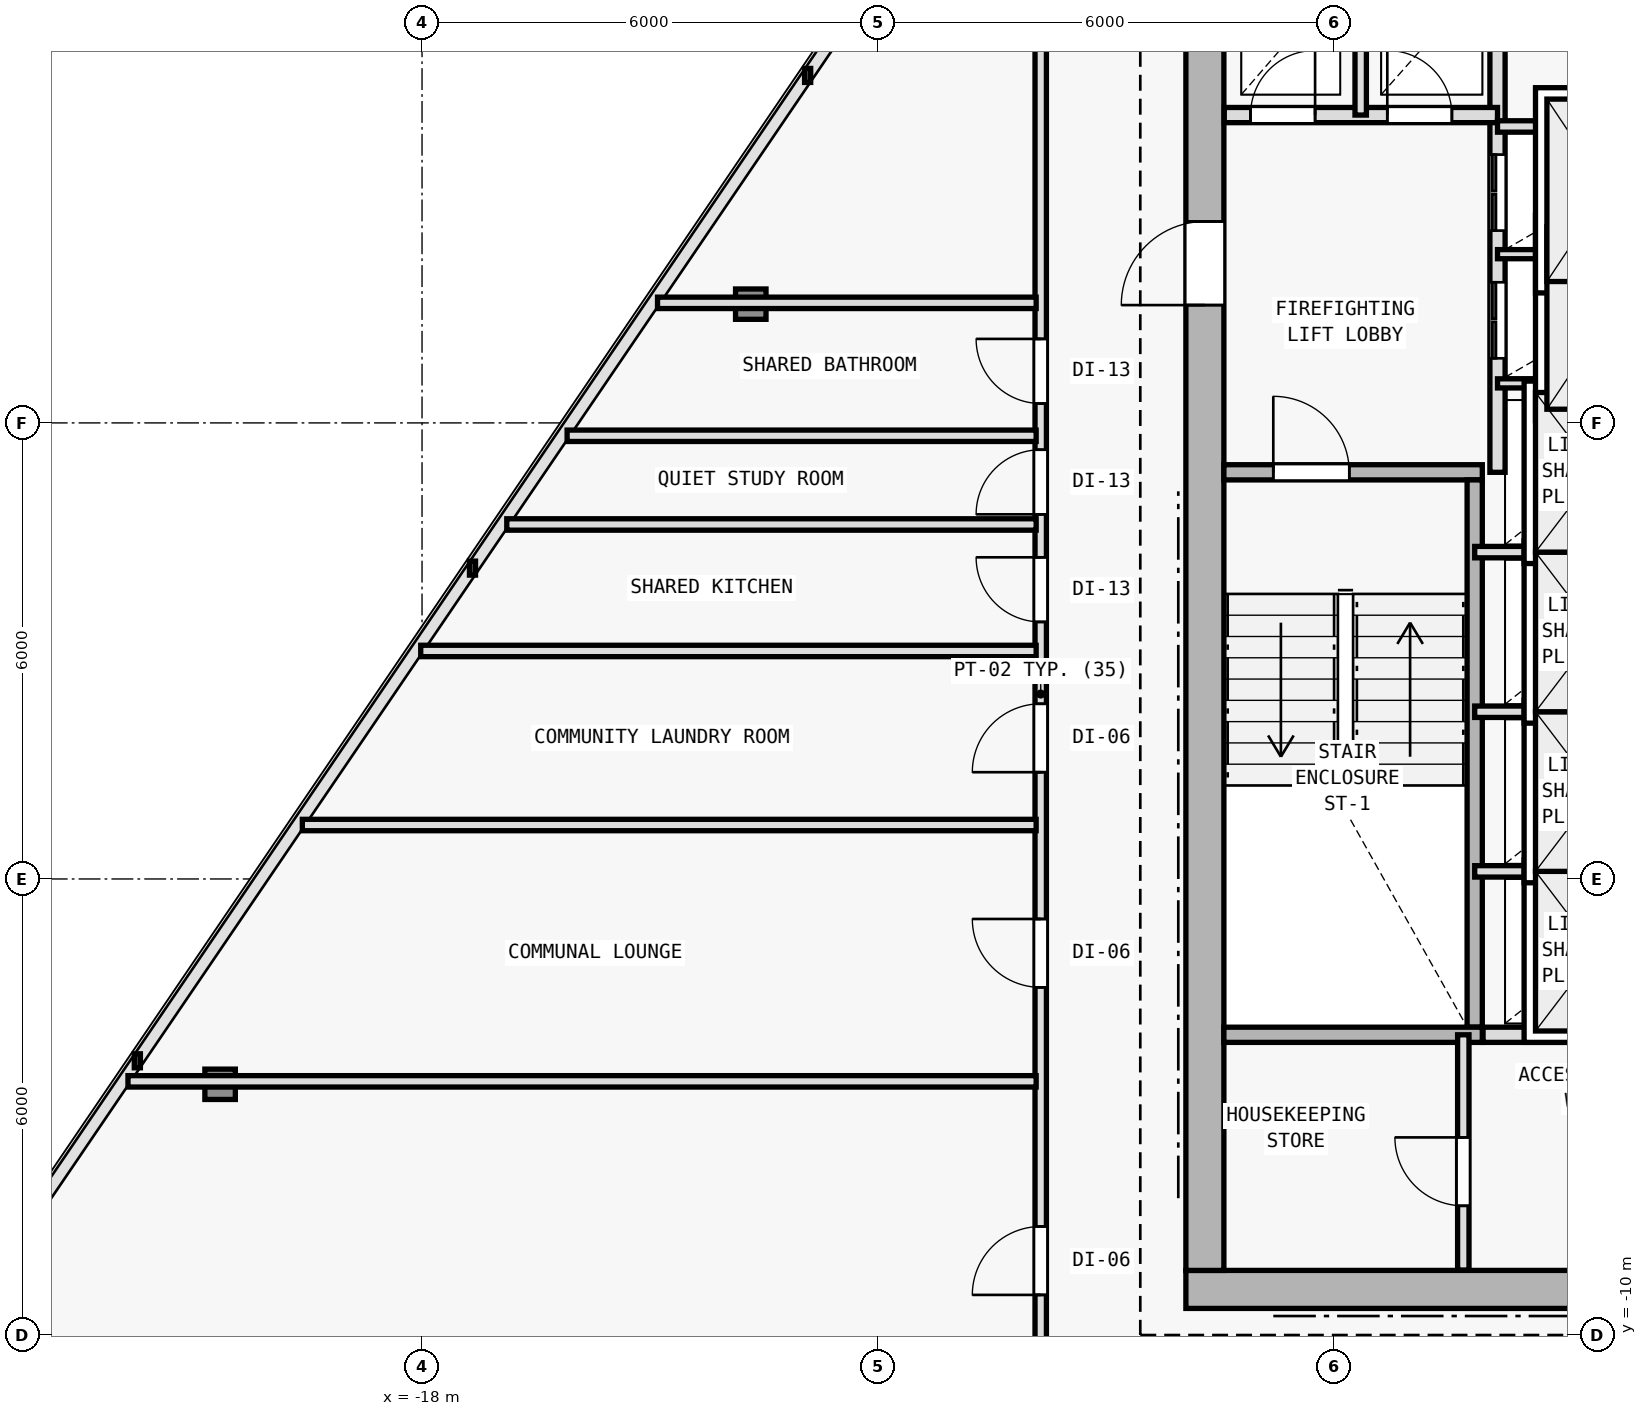
"""IFC4 building model, lengths in metres.
Left out: names, types, materials, properties, quantities, classifications, styles, units other than length and angle.
Written with IfcOpenShell. Run it as: python <this file> out.ifc"""

import sys

from ifc_helpers import new_model, si_unit, direction, frame, frame_2d, origin, origin_2d, place, context, subcontext, project, spatial, rectangle, i_section, extrude, element, fill, save


model = new_model("IFC4")
c1 = context("Model", 3, precision=1e-05, world=origin(), true_north=direction((0.0, 1.0)))
c2 = subcontext(c1, "Body", "Model", "MODEL_VIEW")
j1 = project(units=[si_unit("LENGTHUNIT", "METRE"), si_unit("PLANEANGLEUNIT", "RADIAN")], contexts=[c1])
p1 = place(None, origin())
s1 = spatial("IfcSite", under=j1, at=p1, CompositionType="ELEMENT")
p2 = place(p1, origin())
s2 = spatial("IfcBuilding", under=s1, at=p2, CompositionType="ELEMENT")
p3 = place(p2, frame((0.0, 0.0, 178.2)))
s3 = spatial("IfcBuildingStorey", under=s2, at=p3, CompositionType="ELEMENT", Elevation=178.2)
for number, where, z_axis, x_axis in (
    (1, (-7.7, -9.4, 0.0), (0.0, 0.0, 1.0), (1.0, 0.0, 0.0)),
    (2, (-7.7, 2.0, 0.0), (0.0, 0.0, 1.0), (1.0, 0.0, 0.0)),
):
    element("IfcColumn", number, at=place(p3, frame(where, z_axis=z_axis, x_axis=x_axis)), inside=s3, PredefinedType="COLUMN", context=c2, shape_type="SweptSolid", body=[
        extrude(i_section(OverallWidth=0.404, OverallDepth=0.407, WebThickness=0.017, FlangeThickness=0.028, FilletRadius=0.015, at=origin_2d()), origin(), (0.0, 0.0, 1.0), 3.6),
    ])
p4 = place(p3, frame((-13.675, 3.562, 0.006), z_axis=(0.017071567417, 0.009521989794, 0.999808928394), x_axis=(-0.487119351792, 0.873335409284, 0.0)))
e3 = element("IfcColumn", 3, at=p4, inside=s3, PredefinedType="COLUMN", context=c2, shape_type="SweptSolid", body=[
    extrude(i_section(OverallWidth=0.401, OverallDepth=0.399, WebThickness=0.016, FlangeThickness=0.025, FilletRadius=0.015, at=origin_2d()), origin(), (0.0, 0.0, 1.0), 3.59),
])
p5 = place(p3, frame((-20.657, -6.701, 0.006), z_axis=(0.025224163578, 0.021620711639, 0.999447990843), x_axis=(-0.650791373456, 0.759256602365, 0.0)))
e4 = element("IfcColumn", 4, at=p5, inside=s3, PredefinedType="COLUMN", context=c2, shape_type="SweptSolid", body=[
    extrude(i_section(OverallWidth=0.401, OverallDepth=0.399, WebThickness=0.016, FlangeThickness=0.025, FilletRadius=0.015, at=origin_2d()), origin(), (0.0, 0.0, 1.0), 3.591),
])
p6 = place(p3, frame((-7.95, -9.4, 0.0), z_axis=(0.0, 0.0, 1.0), x_axis=(1.0, 0.0, 0.0)))
e5 = element("IfcWall", 5, at=p6, inside=s3, PredefinedType="SHEAR", context=c2, shape_type="SweptSolid", body=[
    extrude(rectangle(XDim=15.9, YDim=0.5, at=frame_2d((7.95, 0.0))), origin(), (0.0, 0.0, 1.0), 3.35),
])
p7 = place(p6, frame((9.6, 0.0, 0.0)))
e6 = element("IfcOpeningElement", 6, at=p7, cuts=e5, PredefinedType="OPENING", context=c2, shape_type="SweptSolid", body=[
    extrude(rectangle(XDim=1.5, YDim=2.2, at=frame_2d((0.75, 1.1))), frame((0.0, 0.26, 0.0), z_axis=(0.0, -1.0, 0.0), x_axis=(1.0, 0.0, 0.0)), (0.0, 0.0, 1.0), 0.52),
])
p8 = place(p3, frame((-7.7, -9.15, 0.0), z_axis=(0.0, 0.0, 1.0), x_axis=(0.0, 1.0, 0.0)))
e7 = element("IfcWall", 7, at=p8, inside=s3, PredefinedType="SHEAR", context=c2, shape_type="SweptSolid", body=[
    extrude(rectangle(XDim=19.1, YDim=0.5, at=frame_2d((9.55, 0.0))), origin(), (0.0, 0.0, 1.0), 3.35),
])
p9 = place(p8, frame((12.7, 0.0, 0.0)))
e8 = element("IfcOpeningElement", 8, at=p9, cuts=e7, PredefinedType="OPENING", context=c2, shape_type="SweptSolid", body=[
    extrude(rectangle(XDim=1.1, YDim=2.15, at=frame_2d((0.55, 1.075))), frame((0.0, 0.26, 0.0), z_axis=(0.0, -1.0, 0.0), x_axis=(1.0, 0.0, 0.0)), (0.0, 0.0, 1.0), 0.52),
])
p10 = place(p3, frame((-7.45, 1.35, 0.0), z_axis=(0.0, 0.0, 1.0), x_axis=(1.0, 0.0, 0.0)))
e9 = element("IfcWall", 9, at=p10, inside=s3, PredefinedType="SOLIDWALL", context=c2, shape_type="SweptSolid", body=[
    extrude(rectangle(XDim=3.4, YDim=0.2, at=frame_2d((1.7, 0.0))), origin(), (0.0, 0.0, 1.0), 3.35),
])
p11 = place(p10, frame((0.65, 0.0, 0.0)))
e10 = element("IfcOpeningElement", 10, at=p11, cuts=e9, PredefinedType="OPENING", context=c2, shape_type="SweptSolid", body=[
    extrude(rectangle(XDim=1.0, YDim=2.15, at=frame_2d((0.5, 1.075))), frame((0.0, 0.11, 0.0), z_axis=(0.0, -1.0, 0.0), x_axis=(1.0, 0.0, 0.0)), (0.0, 0.0, 1.0), 0.22),
])
p12 = place(p3, frame((-4.15, -5.95, 0.0), z_axis=(0.0, 0.0, 1.0), x_axis=(0.0, 1.0, 0.0)))
e11 = element("IfcWall", 11, at=p12, inside=s3, PredefinedType="SOLIDWALL", context=c2, shape_type="SweptSolid", body=[
    extrude(rectangle(XDim=7.2, YDim=0.2, at=frame_2d((3.6, 0.0))), origin(), (0.0, 0.0, 1.0), 3.35),
])
p13 = place(p3, frame((-3.85, 1.35, 0.0), z_axis=(0.0, 0.0, 1.0), x_axis=(0.0, 1.0, 0.0)))
e12 = element("IfcWall", 12, at=p13, inside=s3, PredefinedType="SOLIDWALL", context=c2, shape_type="SweptSolid", body=[
    extrude(rectangle(XDim=8.595, YDim=0.2, at=frame_2d((4.297, 0.0))), origin(), (0.0, 0.0, 1.0), 3.35),
])
p14 = place(p13, frame((1.5, 0.0, 0.0)))
e13 = element("IfcOpeningElement", 13, at=p14, cuts=e12, PredefinedType="OPENING", context=c2, shape_type="SweptSolid", body=[
    extrude(rectangle(XDim=1.0, YDim=2.15, at=frame_2d((0.5, 1.075))), frame((0.0, 0.11, 0.0), z_axis=(0.0, -1.0, 0.0), x_axis=(1.0, 0.0, 0.0)), (0.0, 0.0, 1.0), 0.22),
])
p15 = place(p13, frame((3.18, 0.0, 0.0)))
e14 = element("IfcOpeningElement", 14, at=p15, cuts=e12, PredefinedType="OPENING", context=c2, shape_type="SweptSolid", body=[
    extrude(rectangle(XDim=1.0, YDim=2.15, at=frame_2d((0.5, 1.075))), frame((0.0, 0.11, 0.0), z_axis=(0.0, -1.0, 0.0), x_axis=(1.0, 0.0, 0.0)), (0.0, 0.0, 1.0), 0.22),
])
p16 = place(p3, frame((-7.445, 6.05, 0.0), z_axis=(0.0, 0.0, 1.0), x_axis=(1.0, 0.0, 0.0)))
e15 = element("IfcWall", 15, at=p16, inside=s3, PredefinedType="SOLIDWALL", context=c2, shape_type="SweptSolid", body=[
    extrude(rectangle(XDim=3.595, YDim=0.2, at=frame_2d((1.797, 0.0))), origin(), (0.0, 0.0, 1.0), 3.35),
])
p17 = place(p16, frame((0.345, 0.0, 0.0)))
e16 = element("IfcOpeningElement", 16, at=p17, cuts=e15, PredefinedType="OPENING", context=c2, shape_type="SweptSolid", body=[
    extrude(rectangle(XDim=0.85, YDim=2.1, at=frame_2d((0.425, 1.05))), frame((0.0, 0.11, 0.0), z_axis=(0.0, -1.0, 0.0), x_axis=(1.0, 0.0, 0.0)), (0.0, 0.0, 1.0), 0.22),
])
p18 = place(p16, frame((2.145, 0.0, 0.0)))
e17 = element("IfcOpeningElement", 17, at=p18, cuts=e15, PredefinedType="OPENING", context=c2, shape_type="SweptSolid", body=[
    extrude(rectangle(XDim=0.85, YDim=2.1, at=frame_2d((0.425, 1.05))), frame((0.0, 0.11, 0.0), z_axis=(0.0, -1.0, 0.0), x_axis=(1.0, 0.0, 0.0)), (0.0, 0.0, 1.0), 0.22),
])
p19 = place(p3, frame((-5.65, 6.05, 0.0), z_axis=(0.0, 0.0, 1.0), x_axis=(0.0, 1.0, 0.0)))
e18 = element("IfcWall", 18, at=p19, inside=s3, PredefinedType="PARTITIONING", context=c2, shape_type="SweptSolid", body=[
    extrude(rectangle(XDim=2.05, YDim=0.15, at=frame_2d((1.025, 0.0))), origin(), (0.0, 0.0, 1.0), 3.35),
])
for number, where, z_axis, x_axis in (
    (19, (-3.85, 2.52, 0.0), (0.0, 0.0, 1.0), (1.0, 0.0, 0.0)),
    (20, (-3.85, 4.22, 0.0), (0.0, 0.0, 1.0), (1.0, 0.0, 0.0)),
):
    element("IfcWall", number, at=place(p3, frame(where, z_axis=z_axis, x_axis=x_axis)), inside=s3, PredefinedType="PARTITIONING", context=c2, shape_type="SweptSolid", body=[
        extrude(rectangle(XDim=2.9, YDim=0.12, at=frame_2d((1.45, 0.0))), origin(), (0.0, 0.0, 1.0), 3.35),
    ])
p20 = place(p3, frame((-3.85, 5.9, 0.0), z_axis=(0.0, 0.0, 1.0), x_axis=(1.0, 0.0, 0.0)))
e21 = element("IfcWall", 21, at=p20, inside=s3, PredefinedType="PARTITIONING", context=c2, shape_type="SweptSolid", body=[
    extrude(rectangle(XDim=2.9, YDim=0.15, at=frame_2d((1.45, 0.0))), origin(), (0.0, 0.0, 1.0), 3.35),
])
for number, where, z_axis, x_axis in (
    (22, (-4.15, -3.9, 0.0), (0.0, 0.0, 1.0), (1.0, 0.0, 0.0)),
    (23, (-4.15, -1.8, 0.0), (0.0, 0.0, 1.0), (1.0, 0.0, 0.0)),
    (24, (-4.15, 0.3, 0.0), (0.0, 0.0, 1.0), (1.0, 0.0, 0.0)),
):
    element("IfcWall", number, at=place(p3, frame(where, z_axis=z_axis, x_axis=x_axis)), inside=s3, PredefinedType="PARTITIONING", context=c2, shape_type="SweptSolid", body=[
        extrude(rectangle(XDim=2.9, YDim=0.15, at=frame_2d((1.45, 0.0))), origin(), (0.0, 0.0, 1.0), 3.35),
    ])
p21 = place(p3, frame((-7.45, -6.05, 0.0), z_axis=(0.0, 0.0, 1.0), x_axis=(1.0, 0.0, 0.0)))
e25 = element("IfcWall", 25, at=p21, inside=s3, PredefinedType="SOLIDWALL", context=c2, shape_type="SweptSolid", body=[
    extrude(rectangle(XDim=3.4, YDim=0.2, at=frame_2d((1.7, 0.0))), origin(), (0.0, 0.0, 1.0), 3.35),
])
p22 = place(p3, frame((-4.04, -6.05, 0.0), z_axis=(0.0, 0.0, 1.0), x_axis=(1.0, 0.0, 0.0)))
e26 = element("IfcWall", 26, at=p22, inside=s3, PredefinedType="SOLIDWALL", context=c2, shape_type="SweptSolid", body=[
    extrude(rectangle(XDim=2.79, YDim=0.2, at=frame_2d((1.395, 0.0))), origin(), (0.0, 0.0, 1.0), 3.35),
])
p23 = place(p3, frame((-4.3, -9.145, 0.0), z_axis=(0.0, 0.0, 1.0), x_axis=(0.0, 1.0, 0.0)))
e27 = element("IfcWall", 27, at=p23, inside=s3, PredefinedType="PARTITIONING", context=c2, shape_type="SweptSolid", body=[
    extrude(rectangle(XDim=3.095, YDim=0.15, at=frame_2d((1.547, 0.0))), origin(), (0.0, 0.0, 1.0), 3.35),
])
p24 = place(p23, frame((0.845, 0.0, 0.0)))
e28 = element("IfcOpeningElement", 28, at=p24, cuts=e27, PredefinedType="OPENING", context=c2, shape_type="SweptSolid", body=[
    extrude(rectangle(XDim=0.9, YDim=2.1, at=frame_2d((0.45, 1.05))), frame((0.0, 0.085, 0.0), z_axis=(0.0, -1.0, 0.0), x_axis=(1.0, 0.0, 0.0)), (0.0, 0.0, 1.0), 0.17),
])
p25 = place(p3, frame((-9.86, -11.56, 0.0), z_axis=(0.0, 0.0, 1.0), x_axis=(0.0, 1.0, 0.0)))
e29 = element("IfcWall", 29, at=p25, inside=s3, PredefinedType="PARTITIONING", context=c2, shape_type="SweptSolid", body=[
    extrude(rectangle(XDim=19.986, YDim=0.15, at=frame_2d((9.993, 0.0))), origin(), (0.0, 0.0, 1.0), 2.825),
])
p26 = place(p25, frame((10.942, 0.0, 0.0)))
e30 = element("IfcOpeningElement", 30, at=p26, cuts=e29, PredefinedType="OPENING", context=c2, shape_type="SweptSolid", body=[
    extrude(rectangle(XDim=0.85, YDim=2.1, at=frame_2d((0.425, 1.05))), frame((0.0, 0.085, 0.0), z_axis=(0.0, -1.0, 0.0), x_axis=(1.0, 0.0, 0.0)), (0.0, 0.0, 1.0), 0.17),
])
p27 = place(p25, frame((8.965, 0.0, 0.0)))
e31 = element("IfcOpeningElement", 31, at=p27, cuts=e29, PredefinedType="OPENING", context=c2, shape_type="SweptSolid", body=[
    extrude(rectangle(XDim=0.9, YDim=2.1, at=frame_2d((0.45, 1.05))), frame((0.0, 0.085, 0.0), z_axis=(0.0, -1.0, 0.0), x_axis=(1.0, 0.0, 0.0)), (0.0, 0.0, 1.0), 0.17),
])
p28 = place(p25, frame((6.134, 0.0, 0.0)))
e32 = element("IfcOpeningElement", 32, at=p28, cuts=e29, PredefinedType="OPENING", context=c2, shape_type="SweptSolid", body=[
    extrude(rectangle(XDim=0.9, YDim=2.1, at=frame_2d((0.45, 1.05))), frame((0.0, 0.085, 0.0), z_axis=(0.0, -1.0, 0.0), x_axis=(1.0, 0.0, 0.0)), (0.0, 0.0, 1.0), 0.17),
])
p29 = place(p25, frame((2.088, 0.0, 0.0)))
e33 = element("IfcOpeningElement", 33, at=p29, cuts=e29, PredefinedType="OPENING", context=c2, shape_type="SweptSolid", body=[
    extrude(rectangle(XDim=0.9, YDim=2.1, at=frame_2d((0.45, 1.05))), frame((0.0, 0.085, 0.0), z_axis=(0.0, -1.0, 0.0), x_axis=(1.0, 0.0, 0.0)), (0.0, 0.0, 1.0), 0.17),
])
p30 = place(p25, frame((13.815, 0.0, 0.0)))
e34 = element("IfcOpeningElement", 34, at=p30, cuts=e29, PredefinedType="OPENING", context=c2, shape_type="SweptSolid", body=[
    extrude(rectangle(XDim=0.85, YDim=2.1, at=frame_2d((0.425, 1.05))), frame((0.0, 0.085, 0.0), z_axis=(0.0, -1.0, 0.0), x_axis=(1.0, 0.0, 0.0)), (0.0, 0.0, 1.0), 0.17),
])
p31 = place(p25, frame((12.357, 0.0, 0.0)))
e35 = element("IfcOpeningElement", 35, at=p31, cuts=e29, PredefinedType="OPENING", context=c2, shape_type="SweptSolid", body=[
    extrude(rectangle(XDim=0.85, YDim=2.1, at=frame_2d((0.425, 1.05))), frame((0.0, 0.085, 0.0), z_axis=(0.0, -1.0, 0.0), x_axis=(1.0, 0.0, 0.0)), (0.0, 0.0, 1.0), 0.17),
])
p32 = place(p3, frame((-9.92, 3.58, 0.0), z_axis=(0.0, 0.0, 1.0), x_axis=(-1.0, 0.0, 0.0)))
e36 = element("IfcWall", 36, at=p32, inside=s3, PredefinedType="PARTITIONING", context=c2, shape_type="SweptSolid", body=[
    extrude(rectangle(XDim=4.982, YDim=0.15, at=frame_2d((2.491, 0.0))), origin(), (0.0, 0.0, 1.0), 2.935),
])
p33 = place(p3, frame((-9.92, -6.663, 0.0), z_axis=(0.0, 0.0, 1.0), x_axis=(-1.0, 0.0, 0.0)))
e37 = element("IfcWall", 37, at=p33, inside=s3, PredefinedType="PARTITIONING", context=c2, shape_type="SweptSolid", body=[
    extrude(rectangle(XDim=11.949, YDim=0.15, at=frame_2d((5.975, 0.0))), origin(), (0.0, 0.0, 1.0), 2.825),
])
p34 = place(p3, frame((-9.92, -1.0, 0.0), z_axis=(0.0, 0.0, 1.0), x_axis=(-1.0, 0.0, 0.0)))
e38 = element("IfcWall", 38, at=p34, inside=s3, PredefinedType="PARTITIONING", context=c2, shape_type="SweptSolid", body=[
    extrude(rectangle(XDim=8.097, YDim=0.15, at=frame_2d((4.049, 0.0))), origin(), (0.0, 0.0, 1.0), 2.875),
])
p35 = place(p3, frame((-9.92, -3.29, 0.0), z_axis=(0.0, 0.0, 1.0), x_axis=(-1.0, 0.0, 0.0)))
e39 = element("IfcWall", 39, at=p35, inside=s3, PredefinedType="PARTITIONING", context=c2, shape_type="SweptSolid", body=[
    extrude(rectangle(XDim=9.655, YDim=0.15, at=frame_2d((4.828, 0.0))), origin(), (0.0, 0.0, 1.0), 2.875),
])
p36 = place(p3, frame((-9.92, 1.831, 0.0), z_axis=(0.0, 0.0, 1.0), x_axis=(-1.0, 0.0, 0.0)))
e40 = element("IfcWall", 40, at=p36, inside=s3, PredefinedType="PARTITIONING", context=c2, shape_type="SweptSolid", body=[
    extrude(rectangle(XDim=6.171, YDim=0.15, at=frame_2d((3.086, 0.0))), origin(), (0.0, 0.0, 1.0), 2.875),
])
p37 = place(p3, frame((-9.92, 0.664, 0.0), z_axis=(0.0, 0.0, 1.0), x_axis=(-1.0, 0.0, 0.0)))
e41 = element("IfcWall", 41, at=p37, inside=s3, PredefinedType="PARTITIONING", context=c2, shape_type="SweptSolid", body=[
    extrude(rectangle(XDim=6.965, YDim=0.15, at=frame_2d((3.482, 0.0))), origin(), (0.0, 0.0, 1.0), 2.875),
])
p38 = place(p9, origin())
e42 = element("IfcDoor", 42, at=p38, inside=s3, OperationType="SINGLE_SWING_LEFT", PredefinedType="DOOR", context=c2, shape_type="SweptSolid", body=[
    extrude(rectangle(XDim=1.1, YDim=2.15, at=frame_2d((0.55, 1.075))), frame((0.0, 0.025, 0.0), z_axis=(0.0, -1.0, 0.0), x_axis=(1.0, 0.0, 0.0)), (0.0, 0.0, 1.0), 0.05),
])
fill(e8, e42)
p39 = place(p11, origin())
e43 = element("IfcDoor", 43, at=p39, inside=s3, OperationType="SINGLE_SWING_LEFT", PredefinedType="DOOR", context=c2, shape_type="SweptSolid", body=[
    extrude(rectangle(XDim=1.0, YDim=2.15, at=frame_2d((0.5, 1.075))), frame((0.0, 0.025, 0.0), z_axis=(0.0, -1.0, 0.0), x_axis=(1.0, 0.0, 0.0)), (0.0, 0.0, 1.0), 0.05),
])
fill(e10, e43)
p40 = place(p17, origin())
e44 = element("IfcDoor", 44, at=p40, inside=s3, OperationType="SINGLE_SWING_RIGHT", PredefinedType="DOOR", context=c2, shape_type="SweptSolid", body=[
    extrude(rectangle(XDim=0.85, YDim=2.1, at=frame_2d((0.425, 1.05))), frame((0.0, 0.025, 0.0), z_axis=(0.0, -1.0, 0.0), x_axis=(1.0, 0.0, 0.0)), (0.0, 0.0, 1.0), 0.05),
])
fill(e16, e44)
p41 = place(p18, origin())
e45 = element("IfcDoor", 45, at=p41, inside=s3, OperationType="SINGLE_SWING_LEFT", PredefinedType="DOOR", context=c2, shape_type="SweptSolid", body=[
    extrude(rectangle(XDim=0.85, YDim=2.1, at=frame_2d((0.425, 1.05))), frame((0.0, 0.025, 0.0), z_axis=(0.0, -1.0, 0.0), x_axis=(1.0, 0.0, 0.0)), (0.0, 0.0, 1.0), 0.05),
])
fill(e17, e45)
p42 = place(p14, origin())
e46 = element("IfcDoor", 46, at=p42, inside=s3, OperationType="DOUBLE_DOOR_SLIDING", PredefinedType="DOOR", context=c2, shape_type="SweptSolid", body=[
    extrude(rectangle(XDim=1.0, YDim=2.15, at=frame_2d((0.5, 1.075))), frame((0.0, 0.025, 0.0), z_axis=(0.0, -1.0, 0.0), x_axis=(1.0, 0.0, 0.0)), (0.0, 0.0, 1.0), 0.05),
])
fill(e13, e46)
p43 = place(p15, origin())
e47 = element("IfcDoor", 47, at=p43, inside=s3, OperationType="DOUBLE_DOOR_SLIDING", PredefinedType="DOOR", context=c2, shape_type="SweptSolid", body=[
    extrude(rectangle(XDim=1.0, YDim=2.15, at=frame_2d((0.5, 1.075))), frame((0.0, 0.025, 0.0), z_axis=(0.0, -1.0, 0.0), x_axis=(1.0, 0.0, 0.0)), (0.0, 0.0, 1.0), 0.05),
])
fill(e14, e47)
p44 = place(p24, origin())
e48 = element("IfcDoor", 48, at=p44, inside=s3, OperationType="SINGLE_SWING_RIGHT", PredefinedType="DOOR", context=c2, shape_type="SweptSolid", body=[
    extrude(rectangle(XDim=0.9, YDim=2.1, at=frame_2d((0.45, 1.05))), frame((0.0, 0.025, 0.0), z_axis=(0.0, -1.0, 0.0), x_axis=(1.0, 0.0, 0.0)), (0.0, 0.0, 1.0), 0.05),
])
fill(e28, e48)
p45 = place(p26, origin())
e49 = element("IfcDoor", 49, at=p45, inside=s3, OperationType="SINGLE_SWING_RIGHT", PredefinedType="DOOR", context=c2, shape_type="SweptSolid", body=[
    extrude(rectangle(XDim=0.85, YDim=2.1, at=frame_2d((0.425, 1.05))), frame((0.0, 0.025, 0.0), z_axis=(0.0, -1.0, 0.0), x_axis=(1.0, 0.0, 0.0)), (0.0, 0.0, 1.0), 0.05),
])
fill(e30, e49)
p46 = place(p27, origin())
e50 = element("IfcDoor", 50, at=p46, inside=s3, OperationType="SINGLE_SWING_LEFT", PredefinedType="DOOR", context=c2, shape_type="SweptSolid", body=[
    extrude(rectangle(XDim=0.9, YDim=2.1, at=frame_2d((0.45, 1.05))), frame((0.0, 0.025, 0.0), z_axis=(0.0, -1.0, 0.0), x_axis=(1.0, 0.0, 0.0)), (0.0, 0.0, 1.0), 0.05),
])
fill(e31, e50)
p47 = place(p28, origin())
e51 = element("IfcDoor", 51, at=p47, inside=s3, OperationType="SINGLE_SWING_RIGHT", PredefinedType="DOOR", context=c2, shape_type="SweptSolid", body=[
    extrude(rectangle(XDim=0.9, YDim=2.1, at=frame_2d((0.45, 1.05))), frame((0.0, 0.025, 0.0), z_axis=(0.0, -1.0, 0.0), x_axis=(1.0, 0.0, 0.0)), (0.0, 0.0, 1.0), 0.05),
])
fill(e32, e51)
p48 = place(p29, origin())
e52 = element("IfcDoor", 52, at=p48, inside=s3, OperationType="SINGLE_SWING_LEFT", PredefinedType="DOOR", context=c2, shape_type="SweptSolid", body=[
    extrude(rectangle(XDim=0.9, YDim=2.1, at=frame_2d((0.45, 1.05))), frame((0.0, 0.025, 0.0), z_axis=(0.0, -1.0, 0.0), x_axis=(1.0, 0.0, 0.0)), (0.0, 0.0, 1.0), 0.05),
])
fill(e33, e52)
p49 = place(p30, origin())
e53 = element("IfcDoor", 53, at=p49, inside=s3, OperationType="SINGLE_SWING_RIGHT", PredefinedType="DOOR", context=c2, shape_type="SweptSolid", body=[
    extrude(rectangle(XDim=0.85, YDim=2.1, at=frame_2d((0.425, 1.05))), frame((0.0, 0.025, 0.0), z_axis=(0.0, -1.0, 0.0), x_axis=(1.0, 0.0, 0.0)), (0.0, 0.0, 1.0), 0.05),
])
fill(e34, e53)
p50 = place(p31, origin())
e54 = element("IfcDoor", 54, at=p50, inside=s3, OperationType="SINGLE_SWING_LEFT", PredefinedType="DOOR", context=c2, shape_type="SweptSolid", body=[
    extrude(rectangle(XDim=0.85, YDim=2.1, at=frame_2d((0.425, 1.05))), frame((0.0, 0.025, 0.0), z_axis=(0.0, -1.0, 0.0), x_axis=(1.0, 0.0, 0.0)), (0.0, 0.0, 1.0), 0.05),
])
fill(e35, e54)
save(model, sys.argv[1])
